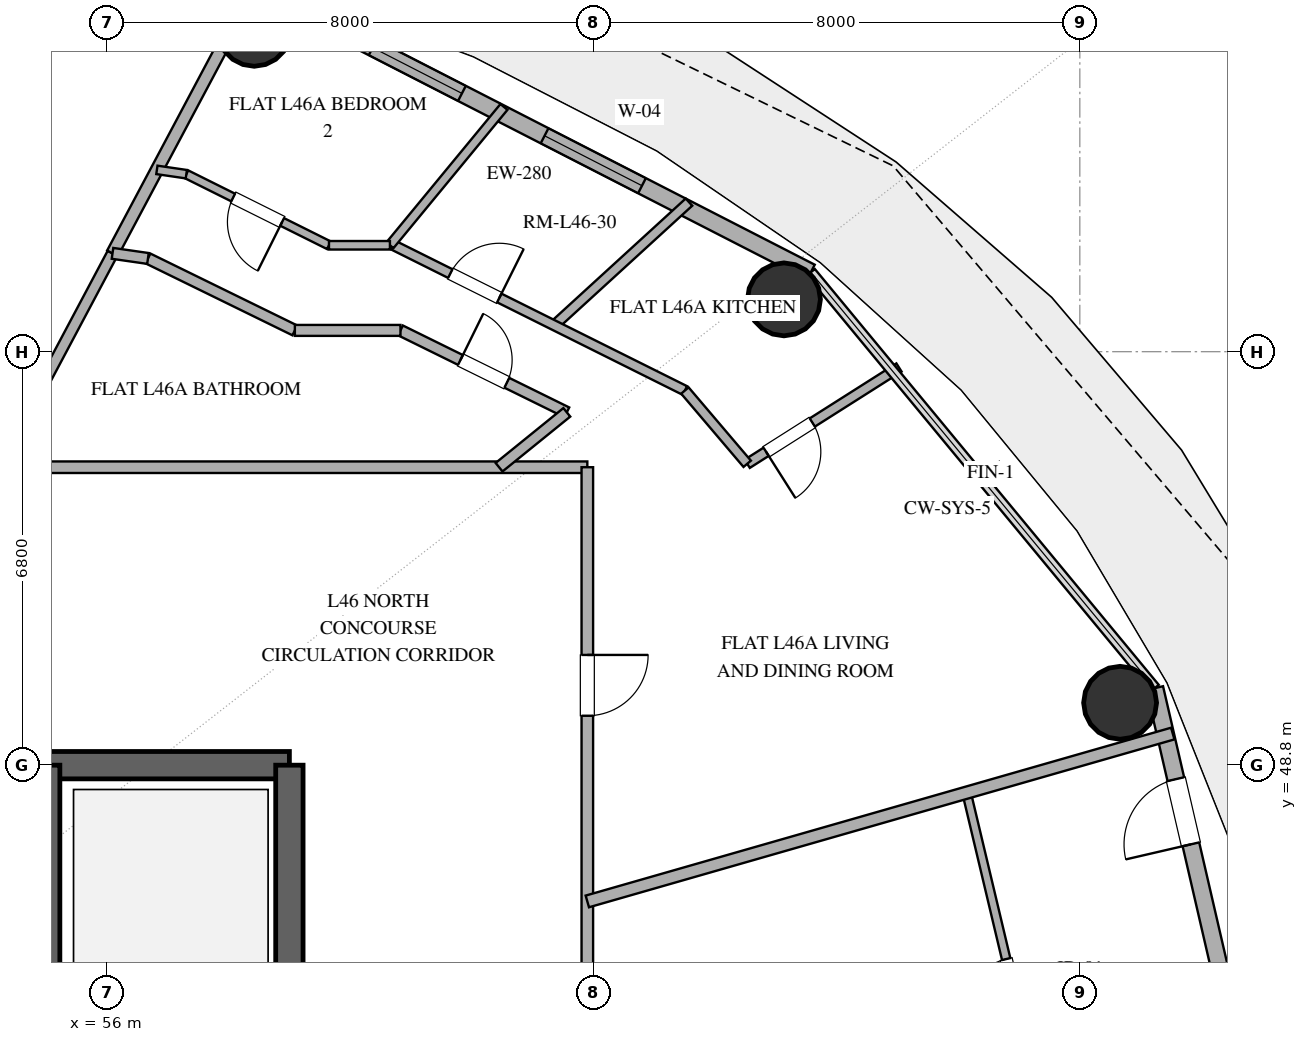
"""IFC4 building model, lengths in metres.
Left out: names, types, materials, properties, quantities, classifications, styles, units other than length and angle.
Written with IfcOpenShell. Run it as: python <this file> out.ifc"""

import sys

from ifc_helpers import new_model, si_unit, direction, frame, frame_2d, origin, origin_2d, place, context, subcontext, project, spatial, rectangle, hollow_circle, extrude, element, fill, save


model = new_model("IFC4")
c1 = context("Model", 3, precision=1e-05, world=origin(), true_north=direction((0.0, 1.0)))
c2 = subcontext(c1, "Body", "Model", "MODEL_VIEW")
j1 = project(units=[si_unit("LENGTHUNIT", "METRE"), si_unit("PLANEANGLEUNIT", "RADIAN")], contexts=[c1])
p1 = place(None, origin())
s1 = spatial("IfcSite", under=j1, at=p1, CompositionType="ELEMENT")
p2 = place(p1, origin())
s2 = spatial("IfcBuilding", under=s1, at=p2, CompositionType="ELEMENT")
p3 = place(p2, frame((0.0, 0.0, 183.0)))
s3 = spatial("IfcBuildingStorey", under=s2, at=p3, CompositionType="ELEMENT", Elevation=183.0)
p4 = place(p3, frame((55.0, 48.8, 0.0), z_axis=(0.0, 0.0, 1.0), x_axis=(1.0, 0.0, 0.0)))
e1 = element("IfcWall", 1, at=p4, inside=s3, PredefinedType="SHEAR", context=c2, shape_type="SweptSolid", body=[
    extrude(rectangle(XDim=4.0, YDim=0.45, at=frame_2d((2.0, 0.0))), origin(), (0.0, 0.0, 1.0), 3.38),
])
p5 = place(p3, frame((59.0, 35.2, 0.0), z_axis=(0.0, 0.0, 1.0), x_axis=(0.0, 1.0, 0.0)))
e2 = element("IfcWall", 2, at=p5, inside=s3, PredefinedType="SHEAR", context=c2, shape_type="SweptSolid", body=[
    extrude(rectangle(XDim=13.6, YDim=0.45, at=frame_2d((6.8, 0.0))), origin(), (0.0, 0.0, 1.0), 3.38),
])
p6 = place(p3, frame((55.0, 35.2, 0.0), z_axis=(0.0, 0.0, 1.0), x_axis=(0.0, 1.0, 0.0)))
e3 = element("IfcWall", 3, at=p6, inside=s3, PredefinedType="SHEAR", context=c2, shape_type="SweptSolid", body=[
    extrude(rectangle(XDim=13.6, YDim=0.45, at=frame_2d((6.8, 0.0))), origin(), (0.0, 0.0, 1.0), 3.38),
])
p7 = place(p6, frame((1.15, 0.0, 0.0)))
e4 = element("IfcOpeningElement", 4, at=p7, cuts=e3, PredefinedType="OPENING", context=c2, shape_type="SweptSolid", body=[
    extrude(rectangle(XDim=1.1, YDim=2.2, at=frame_2d((0.55, 1.1))), frame((0.0, 0.235, 0.0), z_axis=(0.0, -1.0, 0.0), x_axis=(1.0, 0.0, 0.0)), (0.0, 0.0, 1.0), 0.47),
])
for number, where, z_axis, x_axis in (
    (5, (72.662, 49.826, 0.0), (0.0, 0.0, 1.0), (1.0, 0.0, 0.0)),
    (6, (67.134, 56.46, 0.0), (0.0, 0.0, 1.0), (1.0, 0.0, 0.0)),
    (7, (58.422, 60.893, 0.0), (0.0, 0.0, 1.0), (1.0, 0.0, 0.0)),
):
    element("IfcColumn", number, at=place(p3, frame(where, z_axis=z_axis, x_axis=x_axis)), inside=s3, PredefinedType="COLUMN", context=c2, shape_type="SweptSolid", body=[
        extrude(hollow_circle(Radius=0.6, WallThickness=0.032, at=origin_2d()), origin(), (0.0, 0.0, 1.0), 3.38),
    ])
p8 = place(p3, frame((75.099, 42.0, 0.0), z_axis=(0.0, 0.0, 1.0), x_axis=(-0.225473184558, 0.974249374157, 0.0)))
e8 = element("IfcWall", 8, at=p8, inside=s3, PredefinedType="SOLIDWALL", context=c2, shape_type="SweptSolid", body=[
    extrude(rectangle(XDim=8.28, YDim=0.28, at=frame_2d((4.14, 0.0))), origin(), (0.0, 0.0, 1.0), 3.38),
])
p9 = place(p8, frame((5.644, 0.0, 0.0)))
e9 = element("IfcOpeningElement", 9, at=p9, cuts=e8, PredefinedType="OPENING", context=c2, shape_type="SweptSolid", body=[
    extrude(rectangle(XDim=1.1, YDim=2.25, at=frame_2d((0.55, 1.125))), frame((0.0, 0.15, 0.0), z_axis=(0.0, -1.0, 0.0), x_axis=(1.0, 0.0, 0.0)), (0.0, 0.0, 1.0), 0.3),
])
p10 = place(p3, frame((67.576, 56.906, 0.0), z_axis=(0.0, 0.0, 1.0), x_axis=(-0.889872523182, 0.456209263919, 0.0)))
e10 = element("IfcWall", 10, at=p10, inside=s3, PredefinedType="SOLIDWALL", context=c2, shape_type="SweptSolid", body=[
    extrude(rectangle(XDim=10.016, YDim=0.28, at=frame_2d((5.008, 0.0))), origin(), (0.0, 0.0, 1.0), 3.38),
])
p11 = place(p10, frame((3.121, 0.0, 0.85)))
e11 = element("IfcOpeningElement", 11, at=p11, cuts=e10, PredefinedType="OPENING", context=c2, shape_type="SweptSolid", body=[
    extrude(rectangle(XDim=1.8, YDim=2.2, at=frame_2d((0.9, 1.1))), frame((0.0, 0.15, 0.0), z_axis=(0.0, -1.0, 0.0), x_axis=(1.0, 0.0, 0.0)), (0.0, 0.0, 1.0), 0.3),
])
p12 = place(p10, frame((6.448, 0.0, 0.85)))
e12 = element("IfcOpeningElement", 12, at=p12, cuts=e10, PredefinedType="OPENING", context=c2, shape_type="SweptSolid", body=[
    extrude(rectangle(XDim=1.65, YDim=2.0, at=frame_2d((0.825, 1.0))), frame((0.0, 0.15, 0.0), z_axis=(0.0, -1.0, 0.0), x_axis=(1.0, 0.0, 0.0)), (0.0, 0.0, 1.0), 0.3),
])
p13 = place(p3, frame((45.05, 53.7, 0.0), z_axis=(0.0, 0.0, 1.0), x_axis=(1.0, 0.0, 0.0)))
e13 = element("IfcWall", 13, at=p13, inside=s3, PredefinedType="PARTITIONING", context=c2, shape_type="SweptSolid", body=[
    extrude(rectangle(XDim=18.85, YDim=0.19, at=frame_2d((9.425, 0.0))), origin(), (0.0, 0.0, 1.0), 2.74),
])
p14 = place(p13, frame((4.104, 0.0, 0.0)))
e14 = element("IfcOpeningElement", 14, at=p14, cuts=e13, PredefinedType="OPENING", context=c2, shape_type="SweptSolid", body=[
    extrude(rectangle(XDim=1.0, YDim=2.2, at=frame_2d((0.5, 1.1))), frame((0.0, 0.105, 0.0), z_axis=(0.0, -1.0, 0.0), x_axis=(1.0, 0.0, 0.0)), (0.0, 0.0, 1.0), 0.21),
])
p15 = place(p3, frame((63.9, 53.7, 0.0), z_axis=(0.0, 0.0, 1.0), x_axis=(0.0, -1.0, 0.0)))
e15 = element("IfcWall", 15, at=p15, inside=s3, PredefinedType="PARTITIONING", context=c2, shape_type="SweptSolid", body=[
    extrude(rectangle(XDim=16.292, YDim=0.19, at=frame_2d((8.146, 0.0))), origin(), (0.0, 0.0, 1.0), 2.74),
])
p16 = place(p15, frame((3.087, 0.0, 0.0)))
e16 = element("IfcOpeningElement", 16, at=p16, cuts=e15, PredefinedType="OPENING", context=c2, shape_type="SweptSolid", body=[
    extrude(rectangle(XDim=1.0, YDim=2.2, at=frame_2d((0.5, 1.1))), frame((0.0, 0.105, 0.0), z_axis=(0.0, -1.0, 0.0), x_axis=(1.0, 0.0, 0.0)), (0.0, 0.0, 1.0), 0.21),
])
p17 = place(p3, frame((71.649, 42.0, 0.0), z_axis=(0.0, 0.0, 1.0), x_axis=(-0.231639074409, 0.972801798522, 0.0)))
e17 = element("IfcWall", 17, at=p17, inside=s3, PredefinedType="PARTITIONING", context=c2, shape_type="SweptSolid", body=[
    extrude(rectangle(XDim=6.525, YDim=0.14, at=frame_2d((3.263, 0.0))), origin(), (0.0, 0.0, 1.0), 2.74),
])
p18 = place(p17, frame((2.812, 0.0, 0.0)))
e18 = element("IfcOpeningElement", 18, at=p18, cuts=e17, PredefinedType="OPENING", context=c2, shape_type="SweptSolid", body=[
    extrude(rectangle(XDim=0.9, YDim=2.1, at=frame_2d((0.45, 1.05))), frame((0.0, 0.08, 0.0), z_axis=(0.0, -1.0, 0.0), x_axis=(1.0, 0.0, 0.0)), (0.0, 0.0, 1.0), 0.16),
])
p19 = place(p3, frame((73.528, 49.32, 0.0), z_axis=(0.0, 0.0, 1.0), x_axis=(-0.961265987417, -0.275622389211, 0.0)))
e19 = element("IfcWall", 19, at=p19, inside=s3, PredefinedType="PARTITIONING", context=c2, shape_type="SweptSolid", body=[
    extrude(rectangle(XDim=10.016, YDim=0.2, at=frame_2d((5.008, 0.0))), origin(), (0.0, 0.0, 1.0), 2.74),
])
p20 = place(p3, frame((54.221, 53.7, 0.0), z_axis=(0.0, 0.0, 1.0), x_axis=(0.469480828888, 0.882942665922, 0.0)))
e20 = element("IfcWall", 20, at=p20, inside=s3, PredefinedType="PLUMBINGWALL", context=c2, shape_type="SweptSolid", body=[
    extrude(rectangle(XDim=3.983, YDim=0.18, at=frame_2d((1.992, 0.0))), origin(), (0.0, 0.0, 1.0), 2.74),
])
p21 = place(p3, frame((56.091, 57.217, 0.0), z_axis=(0.0, 0.0, 1.0), x_axis=(0.469455598571, 0.882956080997, 0.0)))
e21 = element("IfcWall", 21, at=p21, inside=s3, PredefinedType="PARTITIONING", context=c2, shape_type="SweptSolid", body=[
    extrude(rectangle(XDim=4.991, YDim=0.2, at=frame_2d((2.496, 0.0))), origin(), (0.0, 0.0, 1.0), 2.74),
])
p22 = place(p3, frame((60.827, 55.95, 0.0), z_axis=(0.0, 0.0, 1.0), x_axis=(0.897069141595, -0.441890207175, 0.0)))
e22 = element("IfcWall", 22, at=p22, inside=s3, PredefinedType="PLUMBINGWALL", context=c2, shape_type="SweptSolid", body=[
    extrude(rectangle(XDim=3.05, YDim=0.18, at=frame_2d((1.525, 0.0))), origin(), (0.0, 0.0, 1.0), 2.74),
])
p23 = place(p22, frame((1.1, 0.0, 0.0)))
e23 = element("IfcOpeningElement", 23, at=p23, cuts=e22, PredefinedType="OPENING", context=c2, shape_type="SweptSolid", body=[
    extrude(rectangle(XDim=0.85, YDim=2.1, at=frame_2d((0.425, 1.05))), frame((0.0, 0.1, 0.0), z_axis=(0.0, -1.0, 0.0), x_axis=(1.0, 0.0, 0.0)), (0.0, 0.0, 1.0), 0.2),
])
p24 = place(p3, frame((63.354, 56.033, 0.0), z_axis=(0.0, 0.0, 1.0), x_axis=(0.738168713693, 0.674616150211, 0.0)))
e24 = element("IfcWall", 24, at=p24, inside=s3, PredefinedType="PLUMBINGWALL", context=c2, shape_type="SweptSolid", body=[
    extrude(rectangle(XDim=3.004, YDim=0.16, at=frame_2d((1.502, 0.0))), origin(), (0.0, 0.0, 1.0), 2.74),
])
p25 = place(p3, frame((60.713, 57.35, 0.0), z_axis=(0.0, 0.0, 1.0), x_axis=(0.894937323042, -0.44619187333, 0.0)))
e25 = element("IfcWall", 25, at=p25, inside=s3, PredefinedType="PLUMBINGWALL", context=c2, shape_type="SweptSolid", body=[
    extrude(rectangle(XDim=5.354, YDim=0.16, at=frame_2d((2.677, 0.0))), origin(), (0.0, 0.0, 1.0), 2.74),
])
p26 = place(p25, frame((1.043, 0.0, 0.0)))
e26 = element("IfcOpeningElement", 26, at=p26, cuts=e25, PredefinedType="OPENING", context=c2, shape_type="SweptSolid", body=[
    extrude(rectangle(XDim=0.9, YDim=2.1, at=frame_2d((0.45, 1.05))), frame((0.0, 0.09, 0.0), z_axis=(0.0, -1.0, 0.0), x_axis=(1.0, 0.0, 0.0)), (0.0, 0.0, 1.0), 0.18),
])
p27 = place(p3, frame((69.026, 55.34, 0.0), z_axis=(0.0, 0.0, 1.0), x_axis=(-0.844378276983, -0.5357474455, 0.0)))
e27 = element("IfcWall", 27, at=p27, inside=s3, PredefinedType="PLUMBINGWALL", context=c2, shape_type="SweptSolid", body=[
    extrude(rectangle(XDim=2.956, YDim=0.16, at=frame_2d((1.478, 0.0))), origin(), (0.0, 0.0, 1.0), 2.74),
])
p28 = place(p27, frame((1.688, 0.0, 0.0)))
e28 = element("IfcOpeningElement", 28, at=p28, cuts=e27, PredefinedType="OPENING", context=c2, shape_type="SweptSolid", body=[
    extrude(rectangle(XDim=0.9, YDim=2.1, at=frame_2d((0.45, 1.05))), frame((0.0, 0.09, 0.0), z_axis=(0.0, -1.0, 0.0), x_axis=(1.0, 0.0, 0.0)), (0.0, 0.0, 1.0), 0.18),
])
p29 = place(p3, frame((62.529, 59.625, 0.0), z_axis=(0.0, 0.0, 1.0), x_axis=(-0.63607001361, -0.771631348369, 0.0)))
e29 = element("IfcWall", 29, at=p29, inside=s3, PredefinedType="PARTITIONING", context=c2, shape_type="SweptSolid", body=[
    extrude(rectangle(XDim=2.948, YDim=0.15, at=frame_2d((1.474, 0.0))), origin(), (0.0, 0.0, 1.0), 2.74),
])
p30 = place(p3, frame((56.674, 57.133, 0.0), z_axis=(0.0, 0.0, 1.0), x_axis=(0.898063439596, -0.439865955105, 0.0)))
e30 = element("IfcWall", 30, at=p30, inside=s3, PredefinedType="PLUMBINGWALL", context=c2, shape_type="SweptSolid", body=[
    extrude(rectangle(XDim=2.69, YDim=0.18, at=frame_2d((1.345, 0.0))), origin(), (0.0, 0.0, 1.0), 2.74),
])
p31 = place(p3, frame((59.651, 57.35, 0.0), z_axis=(0.0, 0.0, 1.0), x_axis=(-0.895041110332, 0.445983644112, 0.0)))
e31 = element("IfcWall", 31, at=p31, inside=s3, PredefinedType="PARTITIONING", context=c2, shape_type="SweptSolid", body=[
    extrude(rectangle(XDim=2.621, YDim=0.14, at=frame_2d((1.311, 0.0))), origin(), (0.0, 0.0, 1.0), 2.74),
])
p32 = place(p31, frame((0.861, 0.0, 0.0)))
e32 = element("IfcOpeningElement", 32, at=p32, cuts=e31, PredefinedType="OPENING", context=c2, shape_type="SweptSolid", body=[
    extrude(rectangle(XDim=0.9, YDim=2.1, at=frame_2d((0.45, 1.05))), frame((0.0, 0.08, 0.0), z_axis=(0.0, -1.0, 0.0), x_axis=(1.0, 0.0, 0.0)), (0.0, 0.0, 1.0), 0.16),
])
p33 = place(p3, frame((59.09, 55.95, 0.0), z_axis=(0.0, 0.0, 1.0), x_axis=(1.0, 0.0, 0.0)))
e33 = element("IfcWall", 33, at=p33, inside=s3, PredefinedType="PLUMBINGWALL", context=c2, shape_type="SweptSolid", body=[
    extrude(rectangle(XDim=1.737, YDim=0.18, at=frame_2d((0.868, 0.0))), origin(), (0.0, 0.0, 1.0), 2.74),
])
p34 = place(p3, frame((66.53, 53.756, 0.0), z_axis=(0.0, 0.0, 1.0), x_axis=(-0.647850029113, 0.76176790414, 0.0)))
e34 = element("IfcWall", 34, at=p34, inside=s3, PredefinedType="PLUMBINGWALL", context=c2, shape_type="SweptSolid", body=[
    extrude(rectangle(XDim=1.582, YDim=0.16, at=frame_2d((0.791, 0.0))), origin(), (0.0, 0.0, 1.0), 2.74),
])
p35 = place(p3, frame((63.563, 54.602, 0.0), z_axis=(0.0, 0.0, 1.0), x_axis=(-0.777201256293, -0.62925210148, 0.0)))
e35 = element("IfcWall", 35, at=p35, inside=s3, PredefinedType="PLUMBINGWALL", context=c2, shape_type="SweptSolid", body=[
    extrude(rectangle(XDim=1.434, YDim=0.18, at=frame_2d((0.717, 0.0))), origin(), (0.0, 0.0, 1.0), 2.74),
])
p36 = place(p3, frame((60.654, 57.35, 0.0), z_axis=(0.0, 0.0, 1.0), x_axis=(-1.0, 0.0, 0.0)))
e36 = element("IfcWall", 36, at=p36, inside=s3, PredefinedType="PARTITIONING", context=c2, shape_type="SweptSolid", body=[
    extrude(rectangle(XDim=1.002, YDim=0.14, at=frame_2d((0.501, 0.0))), origin(), (0.0, 0.0, 1.0), 2.74),
])
p37 = place(p3, frame((56.091, 57.217, 0.0), z_axis=(0.0, 0.0, 1.0), x_axis=(0.989841434531, -0.142175716936, 0.0)))
e37 = element("IfcWall", 37, at=p37, inside=s3, PredefinedType="PLUMBINGWALL", context=c2, shape_type="SweptSolid", body=[
    extrude(rectangle(XDim=0.589, YDim=0.18, at=frame_2d((0.294, 0.0))), origin(), (0.0, 0.0, 1.0), 2.74),
])
p38 = place(p3, frame((57.305, 58.519, 0.0), z_axis=(0.0, 0.0, 1.0), x_axis=(-0.989485449351, 0.144632449754, 0.0)))
e38 = element("IfcWall", 38, at=p38, inside=s3, PredefinedType="PARTITIONING", context=c2, shape_type="SweptSolid", body=[
    extrude(rectangle(XDim=0.49, YDim=0.14, at=frame_2d((0.245, 0.0))), origin(), (0.0, 0.0, 1.0), 2.74),
])
p39 = place(p9, origin())
e39 = element("IfcDoor", 39, at=p39, inside=s3, OperationType="SINGLE_SWING_LEFT", PredefinedType="DOOR", context=c2, shape_type="SweptSolid", body=[
    extrude(rectangle(XDim=1.1, YDim=2.25, at=frame_2d((0.55, 1.125))), frame((0.0, 0.025, 0.0), z_axis=(0.0, -1.0, 0.0), x_axis=(1.0, 0.0, 0.0)), (0.0, 0.0, 1.0), 0.05),
])
fill(e9, e39)
p40 = place(p11, origin())
e40 = element("IfcWindow", 40, at=p40, inside=s3, PartitioningType="SINGLE_PANEL", PredefinedType="WINDOW", context=c2, shape_type="SweptSolid", body=[
    extrude(rectangle(XDim=1.8, YDim=2.2, at=frame_2d((0.9, 1.1))), frame((0.0, 0.03, 0.0), z_axis=(0.0, -1.0, 0.0), x_axis=(1.0, 0.0, 0.0)), (0.0, 0.0, 1.0), 0.06),
])
fill(e11, e40)
p41 = place(p12, origin())
e41 = element("IfcWindow", 41, at=p41, inside=s3, PartitioningType="SINGLE_PANEL", PredefinedType="WINDOW", context=c2, shape_type="SweptSolid", body=[
    extrude(rectangle(XDim=1.65, YDim=2.0, at=frame_2d((0.825, 1.0))), frame((0.0, 0.03, 0.0), z_axis=(0.0, -1.0, 0.0), x_axis=(1.0, 0.0, 0.0)), (0.0, 0.0, 1.0), 0.06),
])
fill(e12, e41)
p42 = place(p16, origin())
e42 = element("IfcDoor", 42, at=p42, inside=s3, OperationType="SINGLE_SWING_LEFT", PredefinedType="DOOR", context=c2, shape_type="SweptSolid", body=[
    extrude(rectangle(XDim=1.0, YDim=2.2, at=frame_2d((0.5, 1.1))), frame((0.0, 0.025, 0.0), z_axis=(0.0, -1.0, 0.0), x_axis=(1.0, 0.0, 0.0)), (0.0, 0.0, 1.0), 0.05),
])
fill(e16, e42)
p43 = place(p18, origin())
e43 = element("IfcDoor", 43, at=p43, inside=s3, OperationType="SINGLE_SWING_LEFT", PredefinedType="DOOR", context=c2, shape_type="SweptSolid", body=[
    extrude(rectangle(XDim=0.9, YDim=2.1, at=frame_2d((0.45, 1.05))), frame((0.0, 0.025, 0.0), z_axis=(0.0, -1.0, 0.0), x_axis=(1.0, 0.0, 0.0)), (0.0, 0.0, 1.0), 0.05),
])
fill(e18, e43)
p44 = place(p23, origin())
e44 = element("IfcDoor", 44, at=p44, inside=s3, OperationType="SINGLE_SWING_LEFT", PredefinedType="DOOR", context=c2, shape_type="SweptSolid", body=[
    extrude(rectangle(XDim=0.85, YDim=2.1, at=frame_2d((0.425, 1.05))), frame((0.0, 0.025, 0.0), z_axis=(0.0, -1.0, 0.0), x_axis=(1.0, 0.0, 0.0)), (0.0, 0.0, 1.0), 0.05),
])
fill(e23, e44)
p45 = place(p26, origin())
e45 = element("IfcDoor", 45, at=p45, inside=s3, OperationType="SINGLE_SWING_RIGHT", PredefinedType="DOOR", context=c2, shape_type="SweptSolid", body=[
    extrude(rectangle(XDim=0.9, YDim=2.1, at=frame_2d((0.45, 1.05))), frame((0.0, 0.025, 0.0), z_axis=(0.0, -1.0, 0.0), x_axis=(1.0, 0.0, 0.0)), (0.0, 0.0, 1.0), 0.05),
])
fill(e26, e45)
p46 = place(p28, origin())
e46 = element("IfcDoor", 46, at=p46, inside=s3, OperationType="SINGLE_SWING_RIGHT", PredefinedType="DOOR", context=c2, shape_type="SweptSolid", body=[
    extrude(rectangle(XDim=0.9, YDim=2.1, at=frame_2d((0.45, 1.05))), frame((0.0, 0.025, 0.0), z_axis=(0.0, -1.0, 0.0), x_axis=(1.0, 0.0, 0.0)), (0.0, 0.0, 1.0), 0.05),
])
fill(e28, e46)
p47 = place(p32, origin())
e47 = element("IfcDoor", 47, at=p47, inside=s3, OperationType="SINGLE_SWING_LEFT", PredefinedType="DOOR", context=c2, shape_type="SweptSolid", body=[
    extrude(rectangle(XDim=0.9, YDim=2.1, at=frame_2d((0.45, 1.05))), frame((0.0, 0.025, 0.0), z_axis=(0.0, -1.0, 0.0), x_axis=(1.0, 0.0, 0.0)), (0.0, 0.0, 1.0), 0.05),
])
fill(e32, e47)
save(model, sys.argv[1])
